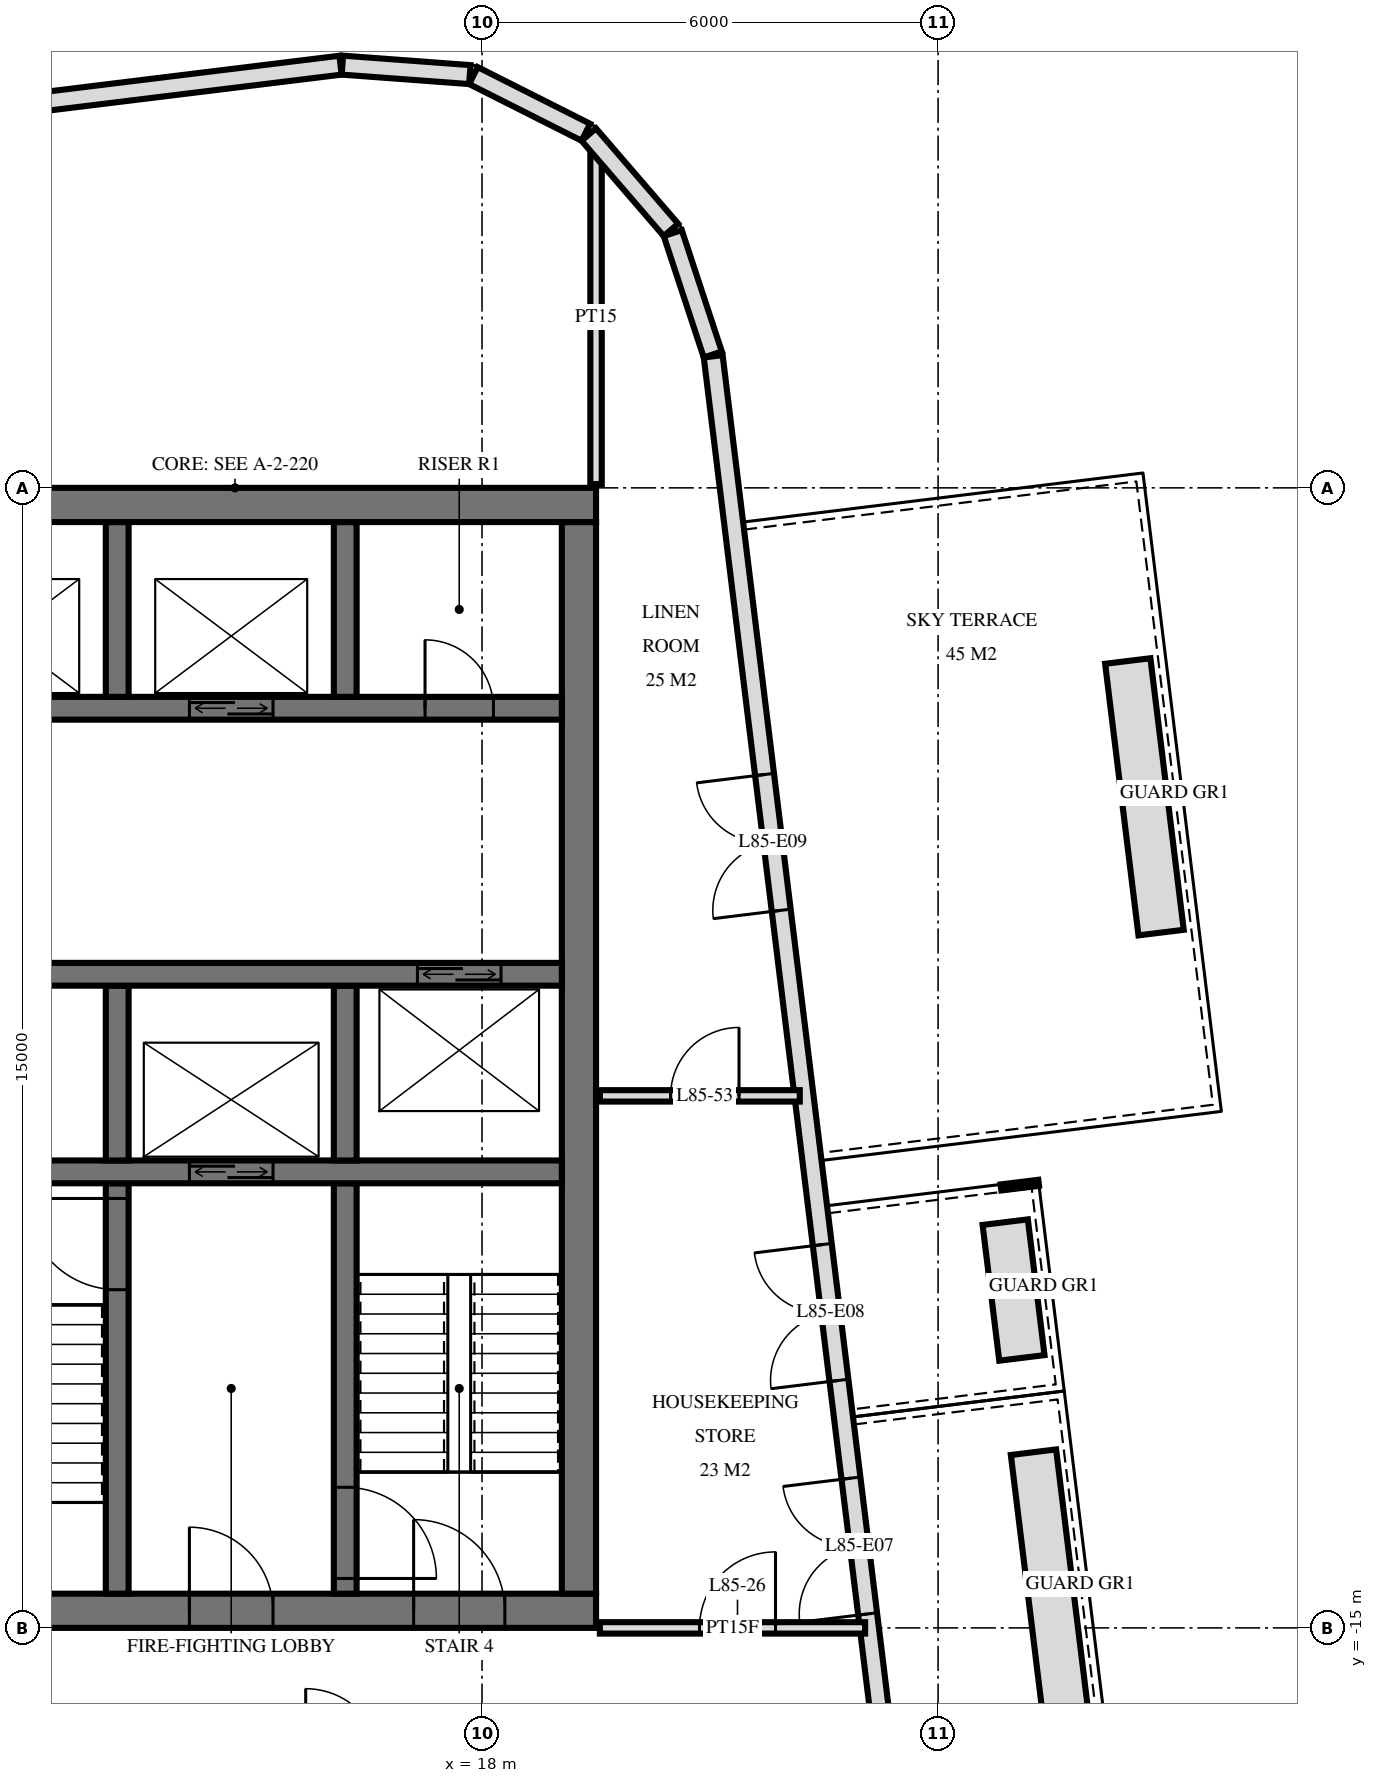
"""IFC4 building model, lengths in metres.
Left out: names, types, materials, properties, quantities, classifications, styles, units other than length and angle.
Written with IfcOpenShell. Run it as: python <this file> out.ifc"""

import sys

from ifc_helpers import new_model, si_unit, direction, frame, frame_2d, origin, place, context, subcontext, project, spatial, rectangle, extrude, element, fill, save


model = new_model("IFC4")
c1 = context("Model", 3, precision=1e-05, world=origin(), true_north=direction((0.0, 1.0)))
c2 = subcontext(c1, "Body", "Model", "MODEL_VIEW")
j1 = project(units=[si_unit("LENGTHUNIT", "METRE"), si_unit("PLANEANGLEUNIT", "RADIAN")], contexts=[c1])
p1 = place(None, origin())
s1 = spatial("IfcSite", under=j1, at=p1, CompositionType="ELEMENT")
p2 = place(p1, origin())
s2 = spatial("IfcBuilding", under=s1, at=p2, CompositionType="ELEMENT")
p3 = place(p2, frame((0.0, 0.0, 322.6)))
s3 = spatial("IfcBuildingStorey", under=s2, at=p3, CompositionType="ELEMENT", Elevation=322.6)
p4 = place(p3, frame((10.0, -0.225, 0.0), z_axis=(0.0, 0.0, 1.0), x_axis=(1.0, 0.0, 0.0)))
e1 = element("IfcWall", 1, at=p4, inside=s3, PredefinedType="SHEAR", context=c2, shape_type="SweptSolid", body=[
    extrude(rectangle(XDim=9.5, YDim=0.45, at=frame_2d((4.75, 0.0))), origin(), (0.0, 0.0, 1.0), 4.0),
])
p5 = place(p3, frame((10.0, -14.775, 0.0), z_axis=(0.0, 0.0, 1.0), x_axis=(1.0, 0.0, 0.0)))
e2 = element("IfcWall", 2, at=p5, inside=s3, PredefinedType="SHEAR", context=c2, shape_type="SweptSolid", body=[
    extrude(rectangle(XDim=9.5, YDim=0.45, at=frame_2d((4.75, 0.0))), origin(), (0.0, 0.0, 1.0), 4.0),
])
p6 = place(p5, frame((7.1, 0.0, 0.0)))
e3 = element("IfcOpeningElement", 3, at=p6, cuts=e2, PredefinedType="OPENING", context=c2, shape_type="SweptSolid", body=[
    extrude(rectangle(XDim=1.2, YDim=2.1, at=frame_2d((0.6, 1.05))), frame((0.0, 0.235, 0.0), z_axis=(0.0, -1.0, 0.0), x_axis=(1.0, 0.0, 0.0)), (0.0, 0.0, 1.0), 0.47),
])
p7 = place(p5, frame((4.15, 0.0, 0.0)))
e4 = element("IfcOpeningElement", 4, at=p7, cuts=e2, PredefinedType="OPENING", context=c2, shape_type="SweptSolid", body=[
    extrude(rectangle(XDim=1.1, YDim=2.1, at=frame_2d((0.55, 1.05))), frame((0.0, 0.235, 0.0), z_axis=(0.0, -1.0, 0.0), x_axis=(1.0, 0.0, 0.0)), (0.0, 0.0, 1.0), 0.47),
])
p8 = place(p3, frame((19.275, -14.55, 0.0), z_axis=(0.0, 0.0, 1.0), x_axis=(0.0, 1.0, 0.0)))
e5 = element("IfcWall", 5, at=p8, inside=s3, PredefinedType="SHEAR", context=c2, shape_type="SweptSolid", body=[
    extrude(rectangle(XDim=14.1, YDim=0.45, at=frame_2d((7.05, 0.0))), origin(), (0.0, 0.0, 1.0), 4.0),
])
p9 = place(p3, frame((10.35, -2.9, 0.0), z_axis=(0.0, 0.0, 1.0), x_axis=(1.0, 0.0, 0.0)))
e6 = element("IfcWall", 6, at=p9, inside=s3, PredefinedType="SHEAR", context=c2, shape_type="SweptSolid", body=[
    extrude(rectangle(XDim=8.7, YDim=0.3, at=frame_2d((4.35, 0.0))), origin(), (0.0, 0.0, 1.0), 4.0),
])
p10 = place(p9, frame((0.8, 0.0, 0.0)))
e7 = element("IfcOpeningElement", 7, at=p10, cuts=e6, PredefinedType="OPENING", context=c2, shape_type="SweptSolid", body=[
    extrude(rectangle(XDim=1.1, YDim=2.1, at=frame_2d((0.55, 1.05))), frame((0.0, 0.16, 0.0), z_axis=(0.0, -1.0, 0.0), x_axis=(1.0, 0.0, 0.0)), (0.0, 0.0, 1.0), 0.32),
])
p11 = place(p9, frame((3.8, 0.0, 0.0)))
e8 = element("IfcOpeningElement", 8, at=p11, cuts=e6, PredefinedType="OPENING", context=c2, shape_type="SweptSolid", body=[
    extrude(rectangle(XDim=1.1, YDim=2.1, at=frame_2d((0.55, 1.05))), frame((0.0, 0.16, 0.0), z_axis=(0.0, -1.0, 0.0), x_axis=(1.0, 0.0, 0.0)), (0.0, 0.0, 1.0), 0.32),
])
p12 = place(p9, frame((6.9, 0.0, 0.0)))
e9 = element("IfcOpeningElement", 9, at=p12, cuts=e6, PredefinedType="OPENING", context=c2, shape_type="SweptSolid", body=[
    extrude(rectangle(XDim=0.9, YDim=2.1, at=frame_2d((0.45, 1.05))), frame((0.0, 0.16, 0.0), z_axis=(0.0, -1.0, 0.0), x_axis=(1.0, 0.0, 0.0)), (0.0, 0.0, 1.0), 0.32),
])
p13 = place(p3, frame((10.35, -6.4, 0.0), z_axis=(0.0, 0.0, 1.0), x_axis=(1.0, 0.0, 0.0)))
e10 = element("IfcWall", 10, at=p13, inside=s3, PredefinedType="SHEAR", context=c2, shape_type="SweptSolid", body=[
    extrude(rectangle(XDim=8.7, YDim=0.3, at=frame_2d((4.35, 0.0))), origin(), (0.0, 0.0, 1.0), 4.0),
])
p14 = place(p13, frame((6.8, 0.0, 0.0)))
e11 = element("IfcOpeningElement", 11, at=p14, cuts=e10, PredefinedType="OPENING", context=c2, shape_type="SweptSolid", body=[
    extrude(rectangle(XDim=1.1, YDim=2.1, at=frame_2d((0.55, 1.05))), frame((0.0, 0.16, 0.0), z_axis=(0.0, -1.0, 0.0), x_axis=(1.0, 0.0, 0.0)), (0.0, 0.0, 1.0), 0.32),
])
p15 = place(p3, frame((10.35, -9.0, 0.0), z_axis=(0.0, 0.0, 1.0), x_axis=(1.0, 0.0, 0.0)))
e12 = element("IfcWall", 12, at=p15, inside=s3, PredefinedType="SHEAR", context=c2, shape_type="SweptSolid", body=[
    extrude(rectangle(XDim=8.7, YDim=0.3, at=frame_2d((4.35, 0.0))), origin(), (0.0, 0.0, 1.0), 4.0),
])
p16 = place(p15, frame((3.8, 0.0, 0.0)))
e13 = element("IfcOpeningElement", 13, at=p16, cuts=e12, PredefinedType="OPENING", context=c2, shape_type="SweptSolid", body=[
    extrude(rectangle(XDim=1.1, YDim=2.1, at=frame_2d((0.55, 1.05))), frame((0.0, 0.16, 0.0), z_axis=(0.0, -1.0, 0.0), x_axis=(1.0, 0.0, 0.0)), (0.0, 0.0, 1.0), 0.32),
])
for number, where, z_axis, x_axis in (
    (14, (13.2, -2.75, 0.0), (0.0, 0.0, 1.0), (0.0, 1.0, 0.0)),
    (15, (13.2, -8.85, 0.0), (0.0, 0.0, 1.0), (0.0, 1.0, 0.0)),
):
    element("IfcWall", number, at=place(p3, frame(where, z_axis=z_axis, x_axis=x_axis)), inside=s3, PredefinedType="SHEAR", context=c2, shape_type="SweptSolid", body=[
        extrude(rectangle(XDim=2.3, YDim=0.3, at=frame_2d((1.15, 0.0))), origin(), (0.0, 0.0, 1.0), 4.0),
    ])
p17 = place(p3, frame((13.2, -14.55, 0.0), z_axis=(0.0, 0.0, 1.0), x_axis=(0.0, 1.0, 0.0)))
e16 = element("IfcWall", 16, at=p17, inside=s3, PredefinedType="SHEAR", context=c2, shape_type="SweptSolid", body=[
    extrude(rectangle(XDim=5.4, YDim=0.3, at=frame_2d((2.7, 0.0))), origin(), (0.0, 0.0, 1.0), 4.0),
])
p18 = place(p17, frame((4.0, 0.0, 0.0)))
e17 = element("IfcOpeningElement", 17, at=p18, cuts=e16, PredefinedType="OPENING", context=c2, shape_type="SweptSolid", body=[
    extrude(rectangle(XDim=1.2, YDim=2.1, at=frame_2d((0.6, 1.05))), frame((0.0, 0.16, 0.0), z_axis=(0.0, -1.0, 0.0), x_axis=(1.0, 0.0, 0.0)), (0.0, 0.0, 1.0), 0.32),
])
for number, where, z_axis, x_axis in (
    (18, (16.2, -2.75, 0.0), (0.0, 0.0, 1.0), (0.0, 1.0, 0.0)),
    (19, (16.2, -8.85, 0.0), (0.0, 0.0, 1.0), (0.0, 1.0, 0.0)),
):
    element("IfcWall", number, at=place(p3, frame(where, z_axis=z_axis, x_axis=x_axis)), inside=s3, PredefinedType="SHEAR", context=c2, shape_type="SweptSolid", body=[
        extrude(rectangle(XDim=2.3, YDim=0.3, at=frame_2d((1.15, 0.0))), origin(), (0.0, 0.0, 1.0), 4.0),
    ])
p19 = place(p3, frame((16.2, -14.55, 0.0), z_axis=(0.0, 0.0, 1.0), x_axis=(0.0, 1.0, 0.0)))
e20 = element("IfcWall", 20, at=p19, inside=s3, PredefinedType="SHEAR", context=c2, shape_type="SweptSolid", body=[
    extrude(rectangle(XDim=5.4, YDim=0.3, at=frame_2d((2.7, 0.0))), origin(), (0.0, 0.0, 1.0), 4.0),
])
p20 = place(p19, frame((0.2, 0.0, 0.0)))
e21 = element("IfcOpeningElement", 21, at=p20, cuts=e20, PredefinedType="OPENING", context=c2, shape_type="SweptSolid", body=[
    extrude(rectangle(XDim=1.2, YDim=2.1, at=frame_2d((0.6, 1.05))), frame((0.0, 0.16, 0.0), z_axis=(0.0, -1.0, 0.0), x_axis=(1.0, 0.0, 0.0)), (0.0, 0.0, 1.0), 0.32),
])
p21 = place(p3, frame((21.036, 1.755, 0.0), z_axis=(0.0, 0.0, 1.0), x_axis=(-0.313046160822, 0.949737911844, 0.0)))
e22 = element("IfcWall", 22, at=p21, inside=s3, PredefinedType="SOLIDWALL", context=c2, shape_type="SweptSolid", body=[
    extrude(rectangle(XDim=1.681, YDim=0.25, at=frame_2d((0.841, 0.0))), origin(), (0.0, 0.0, 1.0), 3.72),
])
for number, where, z_axis, x_axis in (
    (23, (20.485, 3.394, 0.0), (0.0, 0.0, 1.0), (-0.653, 0.758, 0.0)),
    (24, (19.366, 4.679, 0.0), (0.0, 0.0, 1.0), (-0.893, 0.45, 0.0)),
):
    element("IfcWall", number, at=place(p3, frame(where, z_axis=z_axis, x_axis=x_axis)), inside=s3, PredefinedType="SOLIDWALL", context=c2, shape_type="SweptSolid", body=[
        extrude(rectangle(XDim=1.656, YDim=0.25, at=frame_2d((0.828, 0.0))), origin(), (0.0, 0.0, 1.0), 3.72),
    ])
p22 = place(p3, frame((17.84, 5.438, 0.0), z_axis=(0.0, 0.0, 1.0), x_axis=(-0.997254267475, 0.074053534713, 0.0)))
e25 = element("IfcWall", 25, at=p22, inside=s3, PredefinedType="SOLIDWALL", context=c2, shape_type="SweptSolid", body=[
    extrude(rectangle(XDim=1.681, YDim=0.25, at=frame_2d((0.841, 0.0))), origin(), (0.0, 0.0, 1.0), 3.72),
])
p23 = place(p3, frame((16.138, 5.561, 0.0), z_axis=(0.0, 0.0, 1.0), x_axis=(-0.992546726876, -0.121864658405, 0.0)))
e26 = element("IfcWall", 26, at=p23, inside=s3, PredefinedType="SOLIDWALL", context=c2, shape_type="SweptSolid", body=[
    extrude(rectangle(XDim=35.951, YDim=0.25, at=frame_2d((17.975, 0.0))), origin(), (0.0, 0.0, 1.0), 3.72),
])
p24 = place(p23, frame((12.275, 0.0, 0.0)))
e27 = element("IfcOpeningElement", 27, at=p24, cuts=e26, PredefinedType="OPENING", context=c2, shape_type="SweptSolid", body=[
    extrude(rectangle(XDim=2.4, YDim=2.4, at=frame_2d((1.2, 1.2))), frame((0.0, 0.135, 0.0), z_axis=(0.0, -1.0, 0.0), x_axis=(1.0, 0.0, 0.0)), (0.0, 0.0, 1.0), 0.27),
])
p25 = place(p23, frame((17.865, 0.0, 0.0)))
e28 = element("IfcOpeningElement", 28, at=p25, cuts=e26, PredefinedType="OPENING", context=c2, shape_type="SweptSolid", body=[
    extrude(rectangle(XDim=2.4, YDim=2.4, at=frame_2d((1.2, 1.2))), frame((0.0, 0.135, 0.0), z_axis=(0.0, -1.0, 0.0), x_axis=(1.0, 0.0, 0.0)), (0.0, 0.0, 1.0), 0.27),
])
p26 = place(p23, frame((21.275, 0.0, 0.0)))
e29 = element("IfcOpeningElement", 29, at=p26, cuts=e26, PredefinedType="OPENING", context=c2, shape_type="SweptSolid", body=[
    extrude(rectangle(XDim=2.4, YDim=2.4, at=frame_2d((1.2, 1.2))), frame((0.0, 0.135, 0.0), z_axis=(0.0, -1.0, 0.0), x_axis=(1.0, 0.0, 0.0)), (0.0, 0.0, 1.0), 0.27),
])
p27 = place(p3, frame((23.375, -17.277, 0.0), z_axis=(0.0, 0.0, 1.0), x_axis=(-0.121862878281, 0.992546945437, 0.0)))
e30 = element("IfcWall", 30, at=p27, inside=s3, PredefinedType="SOLIDWALL", context=c2, shape_type="SweptSolid", body=[
    extrude(rectangle(XDim=19.151, YDim=0.25, at=frame_2d((9.575, 0.0))), origin(), (0.0, 0.0, 1.0), 3.72),
])
p28 = place(p27, frame((2.479, 0.0, 0.0)))
e31 = element("IfcOpeningElement", 31, at=p28, cuts=e30, PredefinedType="OPENING", context=c2, shape_type="SweptSolid", body=[
    extrude(rectangle(XDim=1.8, YDim=2.4, at=frame_2d((0.9, 1.2))), frame((0.0, 0.135, 0.0), z_axis=(0.0, -1.0, 0.0), x_axis=(1.0, 0.0, 0.0)), (0.0, 0.0, 1.0), 0.27),
])
p29 = place(p27, frame((5.575, 0.0, 0.0)))
e32 = element("IfcOpeningElement", 32, at=p29, cuts=e30, PredefinedType="OPENING", context=c2, shape_type="SweptSolid", body=[
    extrude(rectangle(XDim=1.8, YDim=2.4, at=frame_2d((0.9, 1.2))), frame((0.0, 0.135, 0.0), z_axis=(0.0, -1.0, 0.0), x_axis=(1.0, 0.0, 0.0)), (0.0, 0.0, 1.0), 0.27),
])
p30 = place(p27, frame((11.807, 0.0, 0.0)))
e33 = element("IfcOpeningElement", 33, at=p30, cuts=e30, PredefinedType="OPENING", context=c2, shape_type="SweptSolid", body=[
    extrude(rectangle(XDim=1.8, YDim=2.4, at=frame_2d((0.9, 1.2))), frame((0.0, 0.135, 0.0), z_axis=(0.0, -1.0, 0.0), x_axis=(1.0, 0.0, 0.0)), (0.0, 0.0, 1.0), 0.27),
])
p31 = place(p3, frame((25.255, -12.688, 0.0), z_axis=(0.0, 0.0, 1.0), x_axis=(0.121864343918, -0.992546765488, 0.0)))
e34 = element("IfcWall", 34, at=p31, inside=s3, PredefinedType="USERDEFINED", context=c2, shape_type="SweptSolid", body=[
    extrude(rectangle(XDim=3.6, YDim=0.6, at=frame_2d((1.8, 0.0))), origin(), (0.0, 0.0, 1.0), 0.65),
])
p32 = place(p3, frame((24.883, -9.662, 0.0), z_axis=(0.0, 0.0, 1.0), x_axis=(0.121830336845, -0.992550940267, 0.0)))
e35 = element("IfcWall", 35, at=p32, inside=s3, PredefinedType="USERDEFINED", context=c2, shape_type="SweptSolid", body=[
    extrude(rectangle(XDim=1.8, YDim=0.6, at=frame_2d((0.9, 0.0))), origin(), (0.0, 0.0, 1.0), 0.65),
])
p33 = place(p3, frame((26.496, -2.278, 0.0), z_axis=(0.0, 0.0, 1.0), x_axis=(0.121864343918, -0.992546765488, 0.0)))
e36 = element("IfcWall", 36, at=p33, inside=s3, PredefinedType="USERDEFINED", context=c2, shape_type="SweptSolid", body=[
    extrude(rectangle(XDim=3.6, YDim=0.6, at=frame_2d((1.8, 0.0))), origin(), (0.0, 0.0, 1.0), 0.65),
])
p34 = place(p3, frame((19.5, 0.05, 0.0), z_axis=(0.0, 0.0, 1.0), x_axis=(0.0, 1.0, 0.0)))
e37 = element("IfcWall", 37, at=p34, inside=s3, PredefinedType="PARTITIONING", context=c2, shape_type="SweptSolid", body=[
    extrude(rectangle(XDim=4.403, YDim=0.15, at=frame_2d((2.202, 0.0))), origin(), (0.0, 0.0, 1.0), 3.72),
])
p35 = place(p3, frame((19.55, -15.0, 0.0), z_axis=(0.0, 0.0, 1.0), x_axis=(1.0, 0.0, 0.0)))
e38 = element("IfcWall", 38, at=p35, inside=s3, PredefinedType="PARTITIONING", context=c2, shape_type="SweptSolid", body=[
    extrude(rectangle(XDim=3.49, YDim=0.15, at=frame_2d((1.745, 0.0))), origin(), (0.0, 0.0, 1.0), 3.72),
])
p36 = place(p35, frame((1.311, 0.0, 0.0)))
e39 = element("IfcOpeningElement", 39, at=p36, cuts=e38, PredefinedType="OPENING", context=c2, shape_type="SweptSolid", body=[
    extrude(rectangle(XDim=1.0, YDim=2.1, at=frame_2d((0.5, 1.05))), frame((0.0, 0.085, 0.0), z_axis=(0.0, -1.0, 0.0), x_axis=(1.0, 0.0, 0.0)), (0.0, 0.0, 1.0), 0.17),
])
p37 = place(p3, frame((19.55, -8.0, 0.0), z_axis=(0.0, 0.0, 1.0), x_axis=(1.0, 0.0, 0.0)))
e40 = element("IfcWall", 40, at=p37, inside=s3, PredefinedType="PARTITIONING", context=c2, shape_type="SweptSolid", body=[
    extrude(rectangle(XDim=2.631, YDim=0.15, at=frame_2d((1.315, 0.0))), origin(), (0.0, 0.0, 1.0), 3.253),
])
p38 = place(p37, frame((0.931, 0.0, 0.0)))
e41 = element("IfcOpeningElement", 41, at=p38, cuts=e40, PredefinedType="OPENING", context=c2, shape_type="SweptSolid", body=[
    extrude(rectangle(XDim=0.9, YDim=2.1, at=frame_2d((0.45, 1.05))), frame((0.0, 0.085, 0.0), z_axis=(0.0, -1.0, 0.0), x_axis=(1.0, 0.0, 0.0)), (0.0, 0.0, 1.0), 0.17),
])
p39 = place(p28, origin())
e42 = element("IfcDoor", 42, at=p39, inside=s3, OperationType="DOUBLE_DOOR_SINGLE_SWING", PredefinedType="DOOR", context=c2, shape_type="SweptSolid", body=[
    extrude(rectangle(XDim=1.8, YDim=2.4, at=frame_2d((0.9, 1.2))), frame((0.0, 0.025, 0.0), z_axis=(0.0, -1.0, 0.0), x_axis=(1.0, 0.0, 0.0)), (0.0, 0.0, 1.0), 0.05),
])
fill(e31, e42)
p40 = place(p29, origin())
e43 = element("IfcDoor", 43, at=p40, inside=s3, OperationType="DOUBLE_DOOR_SINGLE_SWING", PredefinedType="DOOR", context=c2, shape_type="SweptSolid", body=[
    extrude(rectangle(XDim=1.8, YDim=2.4, at=frame_2d((0.9, 1.2))), frame((0.0, 0.025, 0.0), z_axis=(0.0, -1.0, 0.0), x_axis=(1.0, 0.0, 0.0)), (0.0, 0.0, 1.0), 0.05),
])
fill(e32, e43)
p41 = place(p30, origin())
e44 = element("IfcDoor", 44, at=p41, inside=s3, OperationType="DOUBLE_DOOR_SINGLE_SWING", PredefinedType="DOOR", context=c2, shape_type="SweptSolid", body=[
    extrude(rectangle(XDim=1.8, YDim=2.4, at=frame_2d((0.9, 1.2))), frame((0.0, 0.025, 0.0), z_axis=(0.0, -1.0, 0.0), x_axis=(1.0, 0.0, 0.0)), (0.0, 0.0, 1.0), 0.05),
])
fill(e33, e44)
p42 = place(p11, origin())
e45 = element("IfcDoor", 45, at=p42, inside=s3, OperationType="DOUBLE_DOOR_SLIDING", PredefinedType="USERDEFINED", context=c2, shape_type="SweptSolid", body=[
    extrude(rectangle(XDim=1.1, YDim=2.1, at=frame_2d((0.55, 1.05))), frame((0.0, 0.025, 0.0), z_axis=(0.0, -1.0, 0.0), x_axis=(1.0, 0.0, 0.0)), (0.0, 0.0, 1.0), 0.05),
])
fill(e8, e45)
p43 = place(p16, origin())
e46 = element("IfcDoor", 46, at=p43, inside=s3, OperationType="DOUBLE_DOOR_SLIDING", PredefinedType="USERDEFINED", context=c2, shape_type="SweptSolid", body=[
    extrude(rectangle(XDim=1.1, YDim=2.1, at=frame_2d((0.55, 1.05))), frame((0.0, 0.025, 0.0), z_axis=(0.0, -1.0, 0.0), x_axis=(1.0, 0.0, 0.0)), (0.0, 0.0, 1.0), 0.05),
])
fill(e13, e46)
p44 = place(p14, origin())
e47 = element("IfcDoor", 47, at=p44, inside=s3, OperationType="DOUBLE_DOOR_SLIDING", PredefinedType="USERDEFINED", context=c2, shape_type="SweptSolid", body=[
    extrude(rectangle(XDim=1.1, YDim=2.1, at=frame_2d((0.55, 1.05))), frame((0.0, 0.025, 0.0), z_axis=(0.0, -1.0, 0.0), x_axis=(1.0, 0.0, 0.0)), (0.0, 0.0, 1.0), 0.05),
])
fill(e11, e47)
p45 = place(p6, origin())
e48 = element("IfcDoor", 48, at=p45, inside=s3, OperationType="SINGLE_SWING_RIGHT", PredefinedType="DOOR", context=c2, shape_type="SweptSolid", body=[
    extrude(rectangle(XDim=1.2, YDim=2.1, at=frame_2d((0.6, 1.05))), frame((0.0, 0.025, 0.0), z_axis=(0.0, -1.0, 0.0), x_axis=(1.0, 0.0, 0.0)), (0.0, 0.0, 1.0), 0.05),
])
fill(e3, e48)
p46 = place(p7, origin())
e49 = element("IfcDoor", 49, at=p46, inside=s3, OperationType="SINGLE_SWING_RIGHT", PredefinedType="DOOR", context=c2, shape_type="SweptSolid", body=[
    extrude(rectangle(XDim=1.1, YDim=2.1, at=frame_2d((0.55, 1.05))), frame((0.0, 0.025, 0.0), z_axis=(0.0, -1.0, 0.0), x_axis=(1.0, 0.0, 0.0)), (0.0, 0.0, 1.0), 0.05),
])
fill(e4, e49)
p47 = place(p12, origin())
e50 = element("IfcDoor", 50, at=p47, inside=s3, OperationType="SINGLE_SWING_RIGHT", PredefinedType="DOOR", context=c2, shape_type="SweptSolid", body=[
    extrude(rectangle(XDim=0.9, YDim=2.1, at=frame_2d((0.45, 1.05))), frame((0.0, 0.025, 0.0), z_axis=(0.0, -1.0, 0.0), x_axis=(1.0, 0.0, 0.0)), (0.0, 0.0, 1.0), 0.05),
])
fill(e9, e50)
p48 = place(p18, origin())
e51 = element("IfcDoor", 51, at=p48, inside=s3, OperationType="SINGLE_SWING_LEFT", PredefinedType="DOOR", context=c2, shape_type="SweptSolid", body=[
    extrude(rectangle(XDim=1.2, YDim=2.1, at=frame_2d((0.6, 1.05))), frame((0.0, 0.025, 0.0), z_axis=(0.0, -1.0, 0.0), x_axis=(1.0, 0.0, 0.0)), (0.0, 0.0, 1.0), 0.05),
])
fill(e17, e51)
p49 = place(p20, frame((0.6, 0.0, 0.0), z_axis=(0.0, 0.0, 1.0), x_axis=(-1.0, 0.0, 0.0)))
e52 = element("IfcDoor", 52, at=p49, inside=s3, OperationType="SINGLE_SWING_LEFT", PredefinedType="DOOR", context=c2, shape_type="SweptSolid", body=[
    extrude(rectangle(XDim=1.2, YDim=2.1, at=frame_2d((0.0, 1.05))), frame((0.0, -0.025, 0.0), z_axis=(0.0, 1.0, 0.0), x_axis=(-1.0, 0.0, 0.0)), (0.0, 0.0, 1.0), 0.05),
])
fill(e21, e52)
p50 = place(p36, origin())
e53 = element("IfcDoor", 53, at=p50, inside=s3, OperationType="SINGLE_SWING_LEFT", PredefinedType="DOOR", context=c2, shape_type="SweptSolid", body=[
    extrude(rectangle(XDim=1.0, YDim=2.1, at=frame_2d((0.5, 1.05))), frame((0.0, 0.025, 0.0), z_axis=(0.0, -1.0, 0.0), x_axis=(1.0, 0.0, 0.0)), (0.0, 0.0, 1.0), 0.05),
])
fill(e39, e53)
p51 = place(p38, origin())
e54 = element("IfcDoor", 54, at=p51, inside=s3, OperationType="SINGLE_SWING_LEFT", PredefinedType="DOOR", context=c2, shape_type="SweptSolid", body=[
    extrude(rectangle(XDim=0.9, YDim=2.1, at=frame_2d((0.45, 1.05))), frame((0.0, 0.025, 0.0), z_axis=(0.0, -1.0, 0.0), x_axis=(1.0, 0.0, 0.0)), (0.0, 0.0, 1.0), 0.05),
])
fill(e41, e54)
save(model, sys.argv[1])
